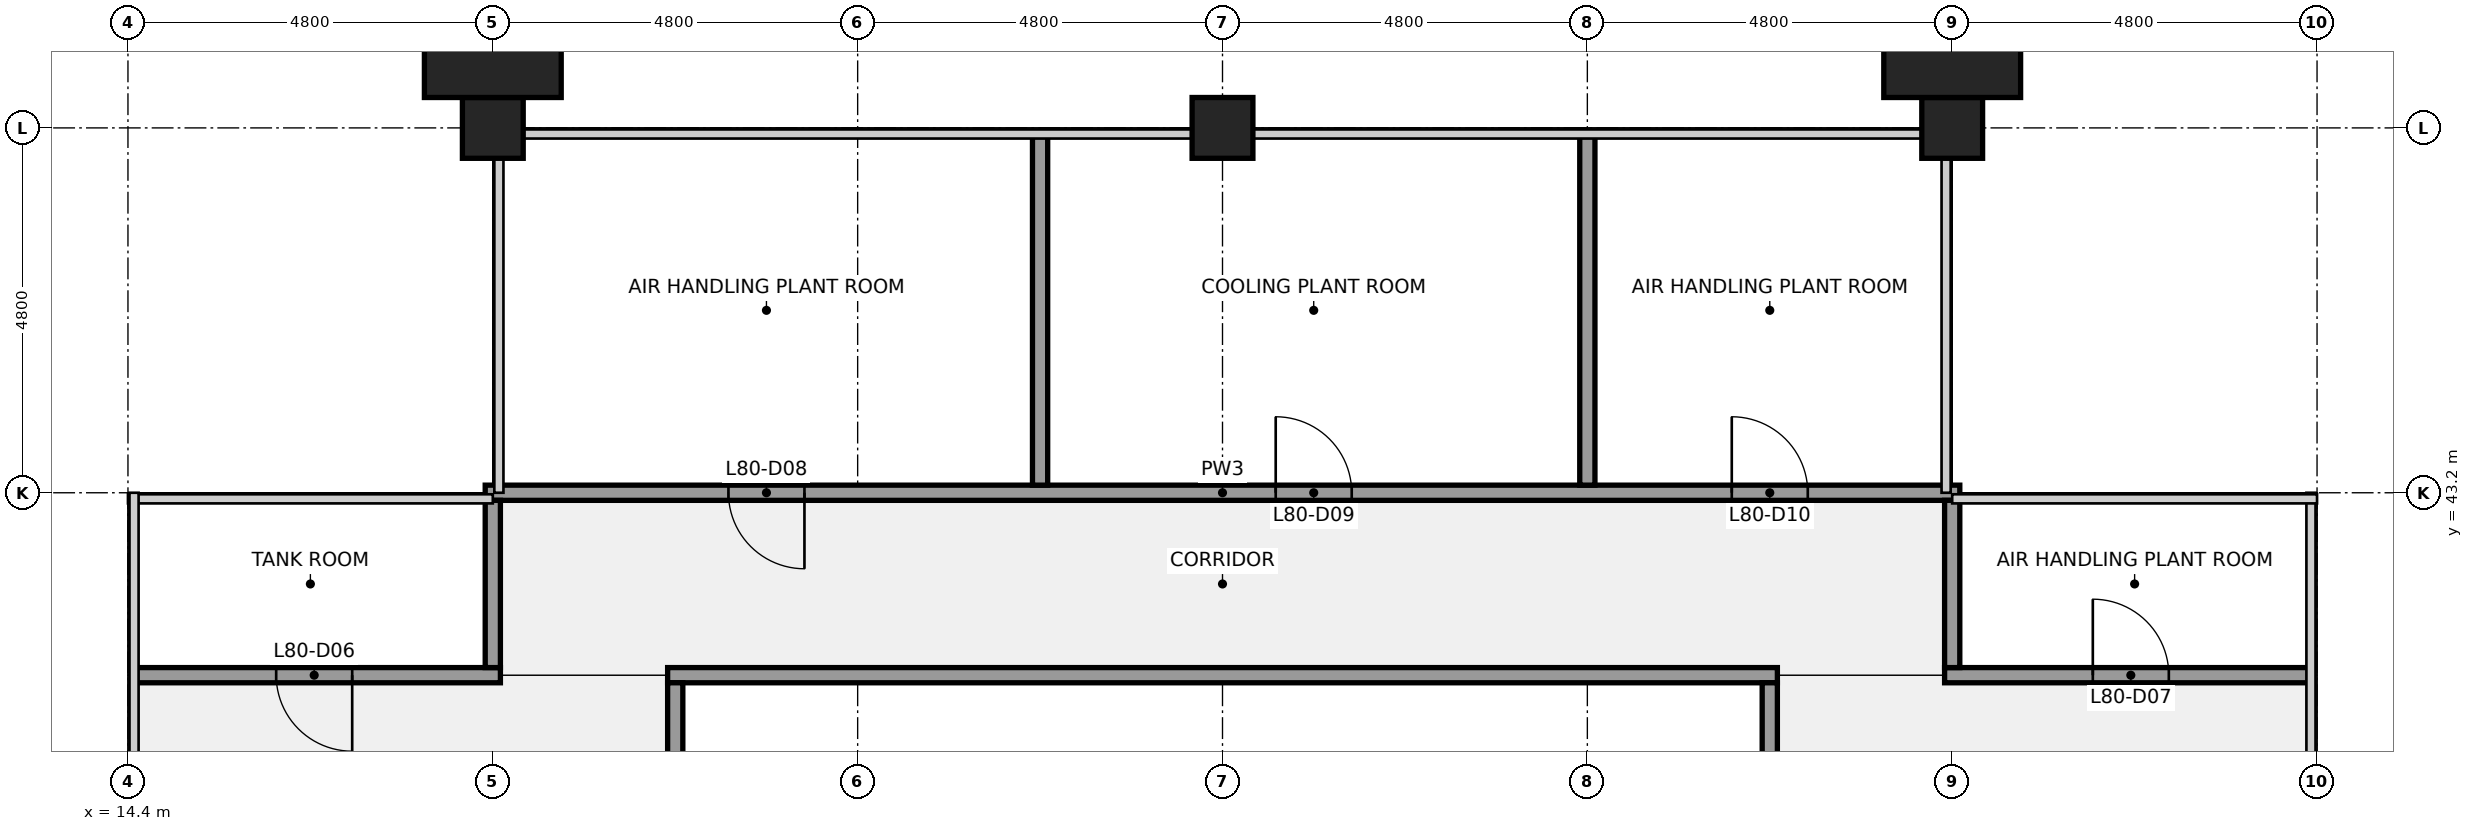
"""IFC4 building model, lengths in metres.
Left out: names, types, materials, properties, quantities, classifications, styles, units other than length and angle.
Written with IfcOpenShell. Run it as: python <this file> out.ifc"""

import sys

from ifc_helpers import new_model, si_unit, direction, frame, frame_2d, origin, origin_2d, place, context, subcontext, project, spatial, rectangle, extrude, element, fill, save


model = new_model("IFC4")
c1 = context("Model", 3, precision=1e-05, world=origin(), true_north=direction((0.0, 1.0)))
c2 = subcontext(c1, "Body", "Model", "MODEL_VIEW")
j1 = project(units=[si_unit("LENGTHUNIT", "METRE"), si_unit("PLANEANGLEUNIT", "RADIAN")], contexts=[c1])
p1 = place(None, origin())
s1 = spatial("IfcSite", under=j1, at=p1, CompositionType="ELEMENT")
p2 = place(p1, origin())
s2 = spatial("IfcBuilding", under=s1, at=p2, CompositionType="ELEMENT")
p3 = place(p2, frame((0.0, 0.0, 358.3)))
s3 = spatial("IfcBuildingStorey", under=s2, at=p3, CompositionType="ELEMENT", Elevation=358.3)
for number, where, z_axis, x_axis in (
    (1, (19.2, 48.0, 0.0), (0.0, 0.0, 1.0), (1.0, 0.0, 0.0)),
    (2, (28.8, 48.0, 0.0), (0.0, 0.0, 1.0), (1.0, 0.0, 0.0)),
    (3, (38.4, 48.0, 0.0), (0.0, 0.0, 1.0), (1.0, 0.0, 0.0)),
):
    element("IfcColumn", number, at=place(p3, frame(where, z_axis=z_axis, x_axis=x_axis)), inside=s3, PredefinedType="COLUMN", context=c2, shape_type="SweptSolid", body=[
        extrude(rectangle(XDim=0.8, YDim=0.8, at=origin_2d()), origin(), (0.0, 0.0, 1.0), 4.0),
    ])
p4 = place(p3, frame((14.5, 40.8, 0.0), z_axis=(0.0, 0.0, 1.0), x_axis=(1.0, 0.0, 0.0)))
e4 = element("IfcWall", 4, at=p4, inside=s3, PredefinedType="PARTITIONING", context=c2, shape_type="SweptSolid", body=[
    extrude(rectangle(XDim=4.8, YDim=0.2, at=frame_2d((2.4, 0.0))), origin(), (0.0, 0.0, 1.0), 2.759),
])
p5 = place(p4, frame((1.85, 0.0, 0.0)))
e5 = element("IfcOpeningElement", 5, at=p5, cuts=e4, PredefinedType="OPENING", context=c2, shape_type="SweptSolid", body=[
    extrude(rectangle(XDim=1.0, YDim=2.1, at=frame_2d((0.5, 1.05))), frame((0.0, 0.11, 0.0), z_axis=(0.0, -1.0, 0.0), x_axis=(1.0, 0.0, 0.0)), (0.0, 0.0, 1.0), 0.22),
])
p6 = place(p3, frame((21.5, 40.8, 0.0), z_axis=(0.0, 0.0, 1.0), x_axis=(1.0, 0.0, 0.0)))
e6 = element("IfcWall", 6, at=p6, inside=s3, PredefinedType="PARTITIONING", context=c2, shape_type="SweptSolid", body=[
    extrude(rectangle(XDim=14.6, YDim=0.2, at=frame_2d((7.3, 0.0))), origin(), (0.0, 0.0, 1.0), 2.759),
])
p7 = place(p3, frame((38.3, 40.8, 0.0), z_axis=(0.0, 0.0, 1.0), x_axis=(1.0, 0.0, 0.0)))
e7 = element("IfcWall", 7, at=p7, inside=s3, PredefinedType="PARTITIONING", context=c2, shape_type="SweptSolid", body=[
    extrude(rectangle(XDim=4.8, YDim=0.2, at=frame_2d((2.4, 0.0))), origin(), (0.0, 0.0, 1.0), 2.759),
])
p8 = place(p7, frame((1.95, 0.0, 0.0)))
e8 = element("IfcOpeningElement", 8, at=p8, cuts=e7, PredefinedType="OPENING", context=c2, shape_type="SweptSolid", body=[
    extrude(rectangle(XDim=1.0, YDim=2.1, at=frame_2d((0.5, 1.05))), frame((0.0, 0.11, 0.0), z_axis=(0.0, -1.0, 0.0), x_axis=(1.0, 0.0, 0.0)), (0.0, 0.0, 1.0), 0.22),
])
p9 = place(p3, frame((19.1, 43.2, 0.0), z_axis=(0.0, 0.0, 1.0), x_axis=(1.0, 0.0, 0.0)))
e9 = element("IfcWall", 9, at=p9, inside=s3, PredefinedType="PARTITIONING", context=c2, shape_type="SweptSolid", body=[
    extrude(rectangle(XDim=19.4, YDim=0.2, at=frame_2d((9.7, 0.0))), origin(), (0.0, 0.0, 1.0), 2.759),
])
p10 = place(p9, frame((3.2, 0.0, 0.0)))
e10 = element("IfcOpeningElement", 10, at=p10, cuts=e9, PredefinedType="OPENING", context=c2, shape_type="SweptSolid", body=[
    extrude(rectangle(XDim=1.0, YDim=2.1, at=frame_2d((0.5, 1.05))), frame((0.0, 0.11, 0.0), z_axis=(0.0, -1.0, 0.0), x_axis=(1.0, 0.0, 0.0)), (0.0, 0.0, 1.0), 0.22),
])
p11 = place(p9, frame((10.4, 0.0, 0.0)))
e11 = element("IfcOpeningElement", 11, at=p11, cuts=e9, PredefinedType="OPENING", context=c2, shape_type="SweptSolid", body=[
    extrude(rectangle(XDim=1.0, YDim=2.1, at=frame_2d((0.5, 1.05))), frame((0.0, 0.11, 0.0), z_axis=(0.0, -1.0, 0.0), x_axis=(1.0, 0.0, 0.0)), (0.0, 0.0, 1.0), 0.22),
])
p12 = place(p9, frame((16.4, 0.0, 0.0)))
e12 = element("IfcOpeningElement", 12, at=p12, cuts=e9, PredefinedType="OPENING", context=c2, shape_type="SweptSolid", body=[
    extrude(rectangle(XDim=1.0, YDim=2.1, at=frame_2d((0.5, 1.05))), frame((0.0, 0.11, 0.0), z_axis=(0.0, -1.0, 0.0), x_axis=(1.0, 0.0, 0.0)), (0.0, 0.0, 1.0), 0.22),
])
p13 = place(p3, frame((19.2, 40.9, 0.0), z_axis=(0.0, 0.0, 1.0), x_axis=(0.0, 1.0, 0.0)))
e13 = element("IfcWall", 13, at=p13, inside=s3, PredefinedType="PARTITIONING", context=c2, shape_type="SweptSolid", body=[
    extrude(rectangle(XDim=2.2, YDim=0.2, at=frame_2d((1.1, 0.0))), origin(), (0.0, 0.0, 1.0), 2.759),
])
p14 = place(p3, frame((21.6, 24.1, 0.0), z_axis=(0.0, 0.0, 1.0), x_axis=(0.0, 1.0, 0.0)))
e14 = element("IfcWall", 14, at=p14, inside=s3, PredefinedType="PARTITIONING", context=c2, shape_type="SweptSolid", body=[
    extrude(rectangle(XDim=16.6, YDim=0.2, at=frame_2d((8.3, 0.0))), origin(), (0.0, 0.0, 1.0), 2.759),
])
p15 = place(p14, frame((7.8, 0.0, 0.0)))
e15 = element("IfcOpeningElement", 15, at=p15, cuts=e14, PredefinedType="OPENING", context=c2, shape_type="SweptSolid", body=[
    extrude(rectangle(XDim=1.0, YDim=2.1, at=frame_2d((0.5, 1.05))), frame((0.0, 0.11, 0.0), z_axis=(0.0, -1.0, 0.0), x_axis=(1.0, 0.0, 0.0)), (0.0, 0.0, 1.0), 0.22),
])
for number, where, z_axis, x_axis in (
    (16, (26.4, 43.3, 0.0), (0.0, 0.0, 1.0), (0.0, 1.0, 0.0)),
    (17, (33.6, 43.3, 0.0), (0.0, 0.0, 1.0), (0.0, 1.0, 0.0)),
):
    element("IfcWall", number, at=place(p3, frame(where, z_axis=z_axis, x_axis=x_axis)), inside=s3, PredefinedType="PARTITIONING", context=c2, shape_type="SweptSolid", body=[
        extrude(rectangle(XDim=4.6, YDim=0.2, at=frame_2d((2.3, 0.0))), origin(), (0.0, 0.0, 1.0), 2.759),
    ])
p16 = place(p3, frame((36.0, 24.1, 0.0), z_axis=(0.0, 0.0, 1.0), x_axis=(0.0, 1.0, 0.0)))
e18 = element("IfcWall", 18, at=p16, inside=s3, PredefinedType="PARTITIONING", context=c2, shape_type="SweptSolid", body=[
    extrude(rectangle(XDim=16.6, YDim=0.2, at=frame_2d((8.3, 0.0))), origin(), (0.0, 0.0, 1.0), 2.759),
])
p17 = place(p3, frame((38.4, 40.9, 0.0), z_axis=(0.0, 0.0, 1.0), x_axis=(0.0, 1.0, 0.0)))
e19 = element("IfcWall", 19, at=p17, inside=s3, PredefinedType="PARTITIONING", context=c2, shape_type="SweptSolid", body=[
    extrude(rectangle(XDim=2.2, YDim=0.2, at=frame_2d((1.1, 0.0))), origin(), (0.0, 0.0, 1.0), 2.759),
])
for number, where, z_axis, x_axis in (
    (20, (19.2, 48.95, 0.0), (0.0, 0.0, 1.0), (1.0, 0.0, 0.0)),
    (21, (38.4, 48.95, 0.0), (0.0, 0.0, 1.0), (1.0, 0.0, 0.0)),
):
    element("IfcColumn", number, at=place(p3, frame(where, z_axis=z_axis, x_axis=x_axis)), inside=s3, PredefinedType="PILASTER", context=c2, shape_type="SweptSolid", body=[
        extrude(rectangle(XDim=1.8, YDim=1.1, at=origin_2d()), origin(), (0.0, 0.0, 1.0), 4.0),
    ])
p18 = place(p5, origin())
e22 = element("IfcDoor", 22, at=p18, inside=s3, OperationType="SINGLE_SWING_RIGHT", PredefinedType="DOOR", context=c2, shape_type="SweptSolid", body=[
    extrude(rectangle(XDim=1.0, YDim=2.1, at=frame_2d((0.5, 1.05))), frame((0.0, 0.025, 0.0), z_axis=(0.0, -1.0, 0.0), x_axis=(1.0, 0.0, 0.0)), (0.0, 0.0, 1.0), 0.05),
])
fill(e5, e22)
p19 = place(p8, origin())
e23 = element("IfcDoor", 23, at=p19, inside=s3, OperationType="SINGLE_SWING_LEFT", PredefinedType="DOOR", context=c2, shape_type="SweptSolid", body=[
    extrude(rectangle(XDim=1.0, YDim=2.1, at=frame_2d((0.5, 1.05))), frame((0.0, 0.025, 0.0), z_axis=(0.0, -1.0, 0.0), x_axis=(1.0, 0.0, 0.0)), (0.0, 0.0, 1.0), 0.05),
])
fill(e8, e23)
p20 = place(p10, origin())
e24 = element("IfcDoor", 24, at=p20, inside=s3, OperationType="SINGLE_SWING_RIGHT", PredefinedType="DOOR", context=c2, shape_type="SweptSolid", body=[
    extrude(rectangle(XDim=1.0, YDim=2.1, at=frame_2d((0.5, 1.05))), frame((0.0, 0.025, 0.0), z_axis=(0.0, -1.0, 0.0), x_axis=(1.0, 0.0, 0.0)), (0.0, 0.0, 1.0), 0.05),
])
fill(e10, e24)
p21 = place(p11, origin())
e25 = element("IfcDoor", 25, at=p21, inside=s3, OperationType="SINGLE_SWING_LEFT", PredefinedType="DOOR", context=c2, shape_type="SweptSolid", body=[
    extrude(rectangle(XDim=1.0, YDim=2.1, at=frame_2d((0.5, 1.05))), frame((0.0, 0.025, 0.0), z_axis=(0.0, -1.0, 0.0), x_axis=(1.0, 0.0, 0.0)), (0.0, 0.0, 1.0), 0.05),
])
fill(e11, e25)
p22 = place(p12, origin())
e26 = element("IfcDoor", 26, at=p22, inside=s3, OperationType="SINGLE_SWING_LEFT", PredefinedType="DOOR", context=c2, shape_type="SweptSolid", body=[
    extrude(rectangle(XDim=1.0, YDim=2.1, at=frame_2d((0.5, 1.05))), frame((0.0, 0.025, 0.0), z_axis=(0.0, -1.0, 0.0), x_axis=(1.0, 0.0, 0.0)), (0.0, 0.0, 1.0), 0.05),
])
fill(e12, e26)
save(model, sys.argv[1])
